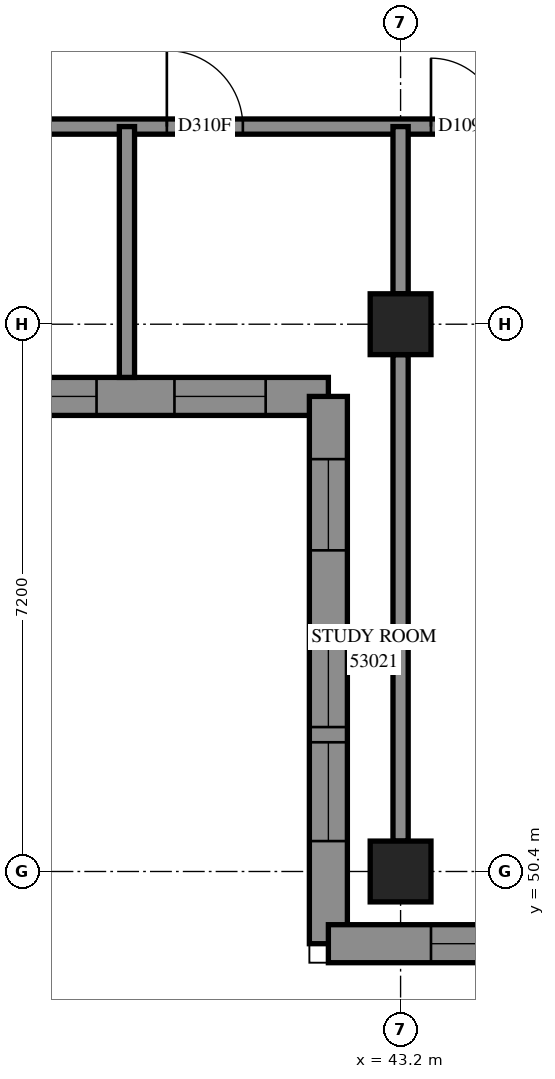
"""IFC4 building model, lengths in metres.
Left out: names, types, materials, properties, quantities, classifications, styles, units other than length and angle.
Written with IfcOpenShell. Run it as: python <this file> out.ifc"""

import sys

from ifc_helpers import new_model, si_unit, direction, frame, frame_2d, origin, origin_2d, place, context, subcontext, project, spatial, polyline, rectangle, outline, extrude, element, fill, save


model = new_model("IFC4")
c1 = context("Model", 3, precision=1e-05, world=origin(), true_north=direction((0.0, 1.0)))
c2 = subcontext(c1, "Body", "Model", "MODEL_VIEW")
j1 = project(units=[si_unit("LENGTHUNIT", "METRE"), si_unit("PLANEANGLEUNIT", "RADIAN")], contexts=[c1])
p1 = place(None, origin())
s1 = spatial("IfcSite", under=j1, at=p1, CompositionType="ELEMENT")
p2 = place(p1, origin())
s2 = spatial("IfcBuilding", under=s1, at=p2, CompositionType="ELEMENT")
p3 = place(p2, frame((0.0, 0.0, 196.4)))
s3 = spatial("IfcBuildingStorey", under=s2, at=p3, CompositionType="ELEMENT", Elevation=196.4)
for number, where, z_axis, x_axis in (
    (1, (43.2, 50.4, 0.0), (0.0, 0.0, 1.0), (1.0, 0.0, 0.0)),
    (2, (43.2, 57.6, 0.0), (0.0, 0.0, 1.0), (1.0, 0.0, 0.0)),
):
    element("IfcColumn", number, at=place(p3, frame(where, z_axis=z_axis, x_axis=x_axis)), inside=s3, PredefinedType="COLUMN", context=c2, shape_type="SweptSolid", body=[
        extrude(rectangle(XDim=0.8, YDim=0.8, at=origin_2d()), origin(), (0.0, 0.0, 1.0), 3.1),
    ])
p4 = place(p3, frame((35.05, 56.65, 0.0), z_axis=(0.0, 0.0, 1.0), x_axis=(1.0, 0.0, 0.0)))
e3 = element("IfcWall", 3, at=p4, inside=s3, PredefinedType="SOLIDWALL", context=c2, shape_type="SweptSolid", body=[
    extrude(outline(polyline([(-0.25, -0.25), (6.95, -0.25), (7.45, 0.25), (0.25, 0.25), (-0.25, -0.25)])), origin(), (0.0, 0.0, 1.0), 3.1),
])
p5 = place(p4, frame((1.35, 0.0, 0.45)))
e4 = element("IfcOpeningElement", 4, at=p5, cuts=e3, PredefinedType="OPENING", context=c2, shape_type="SweptSolid", body=[
    extrude(rectangle(XDim=1.3, YDim=2.5, at=frame_2d((0.65, 1.25))), frame((0.0, 0.26, 0.0), z_axis=(0.0, -1.0, 0.0), x_axis=(1.0, 0.0, 0.0)), (0.0, 0.0, 1.0), 0.52),
])
p6 = place(p4, frame((2.85, 0.0, 0.45)))
e5 = element("IfcOpeningElement", 5, at=p6, cuts=e3, PredefinedType="OPENING", context=c2, shape_type="SweptSolid", body=[
    extrude(rectangle(XDim=1.3, YDim=2.5, at=frame_2d((0.65, 1.25))), frame((0.0, 0.26, 0.0), z_axis=(0.0, -1.0, 0.0), x_axis=(1.0, 0.0, 0.0)), (0.0, 0.0, 1.0), 0.52),
])
p7 = place(p4, frame((5.175, 0.0, 0.45)))
e6 = element("IfcOpeningElement", 6, at=p7, cuts=e3, PredefinedType="OPENING", context=c2, shape_type="SweptSolid", body=[
    extrude(rectangle(XDim=1.2, YDim=2.5, at=frame_2d((0.6, 1.25))), frame((0.0, 0.26, 0.0), z_axis=(0.0, -1.0, 0.0), x_axis=(1.0, 0.0, 0.0)), (0.0, 0.0, 1.0), 0.52),
])
p8 = place(p3, frame((42.25, 56.65, 0.0), z_axis=(0.0, 0.0, 1.0), x_axis=(0.0, -1.0, 0.0)))
e7 = element("IfcWall", 7, at=p8, inside=s3, PredefinedType="SOLIDWALL", context=c2, shape_type="SweptSolid", body=[
    extrude(outline(polyline([(0.25, -0.25), (7.45, -0.25), (6.95, 0.25), (-0.25, 0.25), (0.25, -0.25)])), origin(), (0.0, 0.0, 1.0), 3.1),
])
p9 = place(p8, frame((3.05, 0.0, 0.45)))
e8 = element("IfcOpeningElement", 8, at=p9, cuts=e7, PredefinedType="OPENING", context=c2, shape_type="SweptSolid", body=[
    extrude(rectangle(XDim=1.3, YDim=2.5, at=frame_2d((0.65, 1.25))), frame((0.0, 0.26, 0.0), z_axis=(0.0, -1.0, 0.0), x_axis=(1.0, 0.0, 0.0)), (0.0, 0.0, 1.0), 0.52),
])
p10 = place(p8, frame((4.55, 0.0, 0.45)))
e9 = element("IfcOpeningElement", 9, at=p10, cuts=e7, PredefinedType="OPENING", context=c2, shape_type="SweptSolid", body=[
    extrude(rectangle(XDim=1.3, YDim=2.5, at=frame_2d((0.65, 1.25))), frame((0.0, 0.26, 0.0), z_axis=(0.0, -1.0, 0.0), x_axis=(1.0, 0.0, 0.0)), (0.0, 0.0, 1.0), 0.52),
])
p11 = place(p8, frame((0.825, 0.0, 0.45)))
e10 = element("IfcOpeningElement", 10, at=p11, cuts=e7, PredefinedType="OPENING", context=c2, shape_type="SweptSolid", body=[
    extrude(rectangle(XDim=1.2, YDim=2.5, at=frame_2d((0.6, 1.25))), frame((0.0, 0.26, 0.0), z_axis=(0.0, -1.0, 0.0), x_axis=(1.0, 0.0, 0.0)), (0.0, 0.0, 1.0), 0.52),
])
p12 = place(p3, frame((42.25, 49.45, 0.0), z_axis=(0.0, 0.0, 1.0), x_axis=(1.0, 0.0, 0.0)))
e11 = element("IfcWall", 11, at=p12, inside=s3, PredefinedType="SOLIDWALL", context=c2, shape_type="SweptSolid", body=[
    extrude(outline(polyline([(-0.25, -0.25), (6.95, -0.25), (7.45, 0.25), (0.25, 0.25), (-0.25, -0.25)])), origin(), (0.0, 0.0, 1.0), 3.1),
])
p13 = place(p12, frame((1.35, 0.0, 0.45)))
e12 = element("IfcOpeningElement", 12, at=p13, cuts=e11, PredefinedType="OPENING", context=c2, shape_type="SweptSolid", body=[
    extrude(rectangle(XDim=1.3, YDim=2.5, at=frame_2d((0.65, 1.25))), frame((0.0, 0.26, 0.0), z_axis=(0.0, -1.0, 0.0), x_axis=(1.0, 0.0, 0.0)), (0.0, 0.0, 1.0), 0.52),
])
p14 = place(p12, frame((2.85, 0.0, 0.45)))
e13 = element("IfcOpeningElement", 13, at=p14, cuts=e11, PredefinedType="OPENING", context=c2, shape_type="SweptSolid", body=[
    extrude(rectangle(XDim=1.3, YDim=2.5, at=frame_2d((0.65, 1.25))), frame((0.0, 0.26, 0.0), z_axis=(0.0, -1.0, 0.0), x_axis=(1.0, 0.0, 0.0)), (0.0, 0.0, 1.0), 0.52),
])
p15 = place(p12, frame((5.175, 0.0, 0.45)))
e14 = element("IfcOpeningElement", 14, at=p15, cuts=e11, PredefinedType="OPENING", context=c2, shape_type="SweptSolid", body=[
    extrude(rectangle(XDim=1.2, YDim=2.5, at=frame_2d((0.6, 1.25))), frame((0.0, 0.26, 0.0), z_axis=(0.0, -1.0, 0.0), x_axis=(1.0, 0.0, 0.0)), (0.0, 0.0, 1.0), 0.52),
])
p16 = place(p3, frame((36.0, 60.2, 0.0), z_axis=(0.0, 0.0, 1.0), x_axis=(1.0, 0.0, 0.0)))
e15 = element("IfcWall", 15, at=p16, inside=s3, PredefinedType="PARTITIONING", context=c2, shape_type="SweptSolid", body=[
    extrude(rectangle(XDim=17.0, YDim=0.2, at=frame_2d((8.5, 0.0))), origin(), (0.0, 0.0, 1.0), 3.1),
])
p17 = place(p16, frame((4.125, 0.0, 0.0)))
e16 = element("IfcOpeningElement", 16, at=p17, cuts=e15, PredefinedType="OPENING", context=c2, shape_type="SweptSolid", body=[
    extrude(rectangle(XDim=1.0, YDim=2.1, at=frame_2d((0.5, 1.05))), frame((0.0, 0.11, 0.0), z_axis=(0.0, -1.0, 0.0), x_axis=(1.0, 0.0, 0.0)), (0.0, 0.0, 1.0), 0.22),
])
p18 = place(p16, frame((7.6, 0.0, 0.0)))
e17 = element("IfcOpeningElement", 17, at=p18, cuts=e15, PredefinedType="OPENING", context=c2, shape_type="SweptSolid", body=[
    extrude(rectangle(XDim=0.9, YDim=2.1, at=frame_2d((0.45, 1.05))), frame((0.0, 0.11, 0.0), z_axis=(0.0, -1.0, 0.0), x_axis=(1.0, 0.0, 0.0)), (0.0, 0.0, 1.0), 0.22),
])
p19 = place(p16, frame((11.48, 0.0, 0.0)))
e18 = element("IfcOpeningElement", 18, at=p19, cuts=e15, PredefinedType="OPENING", context=c2, shape_type="SweptSolid", body=[
    extrude(rectangle(XDim=1.0, YDim=2.1, at=frame_2d((0.5, 1.05))), frame((0.0, 0.11, 0.0), z_axis=(0.0, -1.0, 0.0), x_axis=(1.0, 0.0, 0.0)), (0.0, 0.0, 1.0), 0.22),
])
p20 = place(p16, frame((15.805, 0.0, 0.0)))
e19 = element("IfcOpeningElement", 19, at=p20, cuts=e15, PredefinedType="OPENING", context=c2, shape_type="SweptSolid", body=[
    extrude(rectangle(XDim=1.0, YDim=2.1, at=frame_2d((0.5, 1.05))), frame((0.0, 0.11, 0.0), z_axis=(0.0, -1.0, 0.0), x_axis=(1.0, 0.0, 0.0)), (0.0, 0.0, 1.0), 0.22),
])
p21 = place(p3, frame((43.2, 50.8, 0.0), z_axis=(0.0, 0.0, 1.0), x_axis=(0.0, 1.0, 0.0)))
e20 = element("IfcWall", 20, at=p21, inside=s3, PredefinedType="PARTITIONING", context=c2, shape_type="SweptSolid", body=[
    extrude(rectangle(XDim=6.4, YDim=0.2, at=frame_2d((3.2, 0.0))), origin(), (0.0, 0.0, 1.0), 2.6),
])
p22 = place(p3, frame((39.6, 56.9, 0.0), z_axis=(0.0, 0.0, 1.0), x_axis=(0.0, 1.0, 0.0)))
e21 = element("IfcWall", 21, at=p22, inside=s3, PredefinedType="PARTITIONING", context=c2, shape_type="SweptSolid", body=[
    extrude(rectangle(XDim=3.3, YDim=0.2, at=frame_2d((1.65, 0.0))), origin(), (0.0, 0.0, 1.0), 3.1),
])
p23 = place(p3, frame((43.2, 58.0, 0.0), z_axis=(0.0, 0.0, 1.0), x_axis=(0.0, 1.0, 0.0)))
e22 = element("IfcWall", 22, at=p23, inside=s3, PredefinedType="PARTITIONING", context=c2, shape_type="SweptSolid", body=[
    extrude(rectangle(XDim=2.2, YDim=0.2, at=frame_2d((1.1, 0.0))), origin(), (0.0, 0.0, 1.0), 3.1),
])
p24 = place(p6, origin())
e23 = element("IfcWindow", 23, at=p24, inside=s3, PartitioningType="SINGLE_PANEL", PredefinedType="WINDOW", context=c2, shape_type="SweptSolid", body=[
    extrude(rectangle(XDim=1.3, YDim=2.5, at=frame_2d((0.65, 1.25))), frame((0.0, 0.18, 0.0), z_axis=(0.0, -1.0, 0.0), x_axis=(1.0, 0.0, 0.0)), (0.0, 0.0, 1.0), 0.06),
])
fill(e5, e23)
p25 = place(p7, origin())
e24 = element("IfcWindow", 24, at=p25, inside=s3, PartitioningType="SINGLE_PANEL", PredefinedType="WINDOW", context=c2, shape_type="SweptSolid", body=[
    extrude(rectangle(XDim=1.2, YDim=2.5, at=frame_2d((0.6, 1.25))), frame((0.0, 0.18, 0.0), z_axis=(0.0, -1.0, 0.0), x_axis=(1.0, 0.0, 0.0)), (0.0, 0.0, 1.0), 0.06),
])
fill(e6, e24)
p26 = place(p9, origin())
e25 = element("IfcWindow", 25, at=p26, inside=s3, PartitioningType="SINGLE_PANEL", PredefinedType="WINDOW", context=c2, shape_type="SweptSolid", body=[
    extrude(rectangle(XDim=1.3, YDim=2.5, at=frame_2d((0.65, 1.25))), frame((0.0, 0.18, 0.0), z_axis=(0.0, -1.0, 0.0), x_axis=(1.0, 0.0, 0.0)), (0.0, 0.0, 1.0), 0.06),
])
fill(e8, e25)
p27 = place(p10, origin())
e26 = element("IfcWindow", 26, at=p27, inside=s3, PartitioningType="SINGLE_PANEL", PredefinedType="WINDOW", context=c2, shape_type="SweptSolid", body=[
    extrude(rectangle(XDim=1.3, YDim=2.5, at=frame_2d((0.65, 1.25))), frame((0.0, 0.18, 0.0), z_axis=(0.0, -1.0, 0.0), x_axis=(1.0, 0.0, 0.0)), (0.0, 0.0, 1.0), 0.06),
])
fill(e9, e26)
p28 = place(p11, origin())
e27 = element("IfcWindow", 27, at=p28, inside=s3, PartitioningType="SINGLE_PANEL", PredefinedType="WINDOW", context=c2, shape_type="SweptSolid", body=[
    extrude(rectangle(XDim=1.2, YDim=2.5, at=frame_2d((0.6, 1.25))), frame((0.0, 0.18, 0.0), z_axis=(0.0, -1.0, 0.0), x_axis=(1.0, 0.0, 0.0)), (0.0, 0.0, 1.0), 0.06),
])
fill(e10, e27)
p29 = place(p13, origin())
e28 = element("IfcWindow", 28, at=p29, inside=s3, PartitioningType="SINGLE_PANEL", PredefinedType="WINDOW", context=c2, shape_type="SweptSolid", body=[
    extrude(rectangle(XDim=1.3, YDim=2.5, at=frame_2d((0.65, 1.25))), frame((0.0, 0.18, 0.0), z_axis=(0.0, -1.0, 0.0), x_axis=(1.0, 0.0, 0.0)), (0.0, 0.0, 1.0), 0.06),
])
fill(e12, e28)
p30 = place(p17, origin())
e29 = element("IfcDoor", 29, at=p30, inside=s3, OperationType="SINGLE_SWING_RIGHT", PredefinedType="DOOR", context=c2, shape_type="SweptSolid", body=[
    extrude(rectangle(XDim=1.0, YDim=2.1, at=frame_2d((0.5, 1.05))), frame((0.0, 0.025, 0.0), z_axis=(0.0, -1.0, 0.0), x_axis=(1.0, 0.0, 0.0)), (0.0, 0.0, 1.0), 0.05),
])
fill(e16, e29)
p31 = place(p18, origin())
e30 = element("IfcDoor", 30, at=p31, inside=s3, OperationType="SINGLE_SWING_LEFT", PredefinedType="DOOR", context=c2, shape_type="SweptSolid", body=[
    extrude(rectangle(XDim=0.9, YDim=2.1, at=frame_2d((0.45, 1.05))), frame((0.0, 0.025, 0.0), z_axis=(0.0, -1.0, 0.0), x_axis=(1.0, 0.0, 0.0)), (0.0, 0.0, 1.0), 0.05),
])
fill(e17, e30)
save(model, sys.argv[1])
